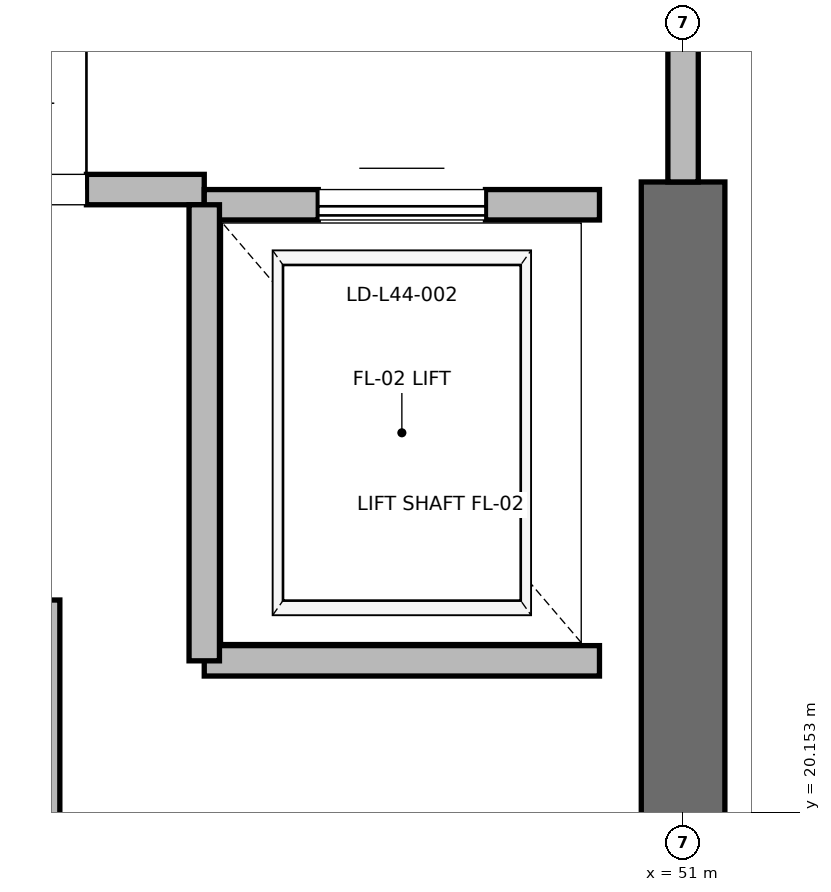
"""IFC4 building model, lengths in metres.
Left out: names, types, materials, properties, quantities, classifications, styles, units other than length and angle.
Written with IfcOpenShell. Run it as: python <this file> out.ifc"""

import sys

from ifc_helpers import new_model, si_unit, direction, frame, frame_2d, origin, place, context, subcontext, project, spatial, rectangle, extrude, element, fill, save


model = new_model("IFC4")
c1 = context("Model", 3, precision=1e-05, world=origin(), true_north=direction((0.0, 1.0)))
c2 = subcontext(c1, "Body", "Model", "MODEL_VIEW")
j1 = project(units=[si_unit("LENGTHUNIT", "METRE"), si_unit("PLANEANGLEUNIT", "RADIAN")], contexts=[c1])
p1 = place(None, origin())
s1 = spatial("IfcSite", under=j1, at=p1, CompositionType="ELEMENT")
p2 = place(p1, origin())
s2 = spatial("IfcBuilding", under=s1, at=p2, CompositionType="ELEMENT")
p3 = place(p2, frame((0.0, 0.0, 189.4)))
s3 = spatial("IfcBuildingStorey", under=s2, at=p3, CompositionType="ELEMENT", Elevation=189.4)
p4 = place(p3, frame((51.0, 18.5, 0.0), z_axis=(0.0, 0.0, 1.0), x_axis=(0.0, 1.0, 0.0)))
e1 = element("IfcWall", 1, at=p4, inside=s3, PredefinedType="SHEAR", context=c2, shape_type="SweptSolid", body=[
    extrude(rectangle(XDim=5.8, YDim=0.55, at=frame_2d((2.9, 0.0))), origin(), (0.0, 0.0, 1.0), 5.1),
])
p5 = place(p3, frame((45.15, 24.25, 0.0), z_axis=(0.0, 0.0, 1.0), x_axis=(1.0, 0.0, 0.0)))
e2 = element("IfcWall", 2, at=p5, inside=s3, PredefinedType="PARTITIONING", context=c2, shape_type="SweptSolid", body=[
    extrude(rectangle(XDim=2.7, YDim=0.2, at=frame_2d((1.35, 0.0))), origin(), (0.0, 0.0, 1.0), 5.1),
])
p6 = place(p5, frame((0.775, 0.0, 0.0)))
e3 = element("IfcOpeningElement", 3, at=p6, cuts=e2, PredefinedType="OPENING", context=c2, shape_type="SweptSolid", body=[
    extrude(rectangle(XDim=1.15, YDim=2.2, at=frame_2d((0.575, 1.1))), frame((0.0, 0.1, 0.0), z_axis=(0.0, -1.0, 0.0), x_axis=(1.0, 0.0, 0.0)), (0.0, 0.0, 1.0), 0.2),
])
p7 = place(p3, frame((51.0, 24.3, 0.0), z_axis=(0.0, 0.0, 1.0), x_axis=(0.0, 1.0, 0.0)))
e4 = element("IfcWall", 4, at=p7, inside=s3, PredefinedType="PARTITIONING", context=c2, shape_type="SweptSolid", body=[
    extrude(rectangle(XDim=3.4, YDim=0.2, at=frame_2d((1.7, 0.0))), origin(), (0.0, 0.0, 1.0), 4.08),
])
p8 = place(p7, frame((1.125, 0.0, 0.0)))
e5 = element("IfcOpeningElement", 5, at=p8, cuts=e4, PredefinedType="OPENING", context=c2, shape_type="SweptSolid", body=[
    extrude(rectangle(XDim=1.15, YDim=2.2, at=frame_2d((0.575, 1.1))), frame((0.0, 0.1, 0.0), z_axis=(0.0, -1.0, 0.0), x_axis=(1.0, 0.0, 0.0)), (0.0, 0.0, 1.0), 0.2),
])
p9 = place(p3, frame((47.85, 21.15, 0.0), z_axis=(0.0, 0.0, 1.0), x_axis=(1.0, 0.0, 0.0)))
e6 = element("IfcWall", 6, at=p9, inside=s3, PredefinedType="SOLIDWALL", context=c2, shape_type="SweptSolid", body=[
    extrude(rectangle(XDim=2.6, YDim=0.2, at=frame_2d((1.3, 0.0))), origin(), (0.0, 0.0, 1.0), 5.1),
])
p10 = place(p3, frame((50.45, 24.15, 0.0), z_axis=(0.0, 0.0, 1.0), x_axis=(-1.0, 0.0, 0.0)))
e7 = element("IfcWall", 7, at=p10, inside=s3, PredefinedType="SOLIDWALL", context=c2, shape_type="SweptSolid", body=[
    extrude(rectangle(XDim=2.6, YDim=0.2, at=frame_2d((1.3, 0.0))), origin(), (0.0, 0.0, 1.0), 4.08),
])
p11 = place(p10, frame((0.75, 0.0, 0.0)))
e8 = element("IfcOpeningElement", 8, at=p11, cuts=e7, PredefinedType="OPENING", context=c2, shape_type="SweptSolid", body=[
    extrude(rectangle(XDim=1.1, YDim=2.2, at=frame_2d((0.55, 1.1))), frame((0.0, 0.1, 0.0), z_axis=(0.0, -1.0, 0.0), x_axis=(1.0, 0.0, 0.0)), (0.0, 0.0, 1.0), 0.2),
])
p12 = place(p3, frame((47.85, 24.15, 0.0), z_axis=(0.0, 0.0, 1.0), x_axis=(0.0, -1.0, 0.0)))
e9 = element("IfcWall", 9, at=p12, inside=s3, PredefinedType="SOLIDWALL", context=c2, shape_type="SweptSolid", body=[
    extrude(rectangle(XDim=3.0, YDim=0.2, at=frame_2d((1.5, 0.0))), origin(), (0.0, 0.0, 1.0), 5.1),
])
p13 = place(p3, frame((46.8, 18.95, 0.0), z_axis=(0.0, 0.0, 1.0), x_axis=(0.0, 1.0, 0.0)))
e10 = element("IfcWall", 10, at=p13, inside=s3, PredefinedType="SOLIDWALL", context=c2, shape_type="SweptSolid", body=[
    extrude(rectangle(XDim=2.6, YDim=0.2, at=frame_2d((1.3, 0.0))), origin(), (0.0, 0.0, 1.0), 5.1),
])
p14 = place(p6, origin())
e11 = element("IfcDoor", 11, at=p14, inside=s3, OperationType="SINGLE_SWING_RIGHT", PredefinedType="DOOR", context=c2, shape_type="SweptSolid", body=[
    extrude(rectangle(XDim=1.15, YDim=2.2, at=frame_2d((0.575, 1.1))), frame((0.0, 0.025, 0.0), z_axis=(0.0, -1.0, 0.0), x_axis=(1.0, 0.0, 0.0)), (0.0, 0.0, 1.0), 0.05),
])
fill(e3, e11)
p15 = place(p11, origin())
e12 = element("IfcDoor", 12, at=p15, inside=s3, OperationType="SLIDING_TO_RIGHT", PredefinedType="DOOR", context=c2, shape_type="SweptSolid", body=[
    extrude(rectangle(XDim=1.1, YDim=2.2, at=frame_2d((0.55, 1.1))), frame((0.0, 0.025, 0.0), z_axis=(0.0, -1.0, 0.0), x_axis=(1.0, 0.0, 0.0)), (0.0, 0.0, 1.0), 0.05),
])
fill(e8, e12)
save(model, sys.argv[1])
